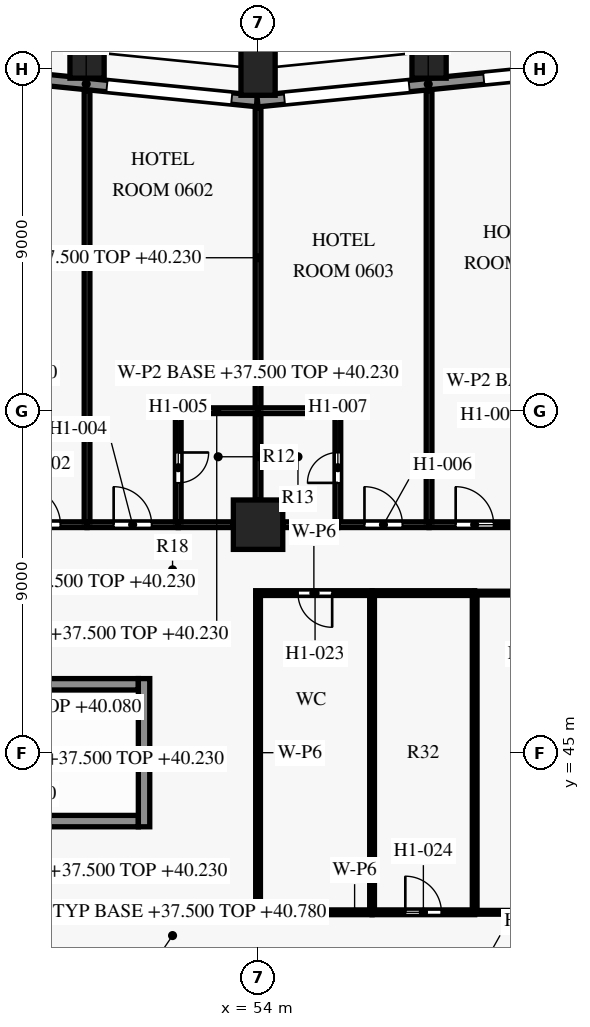
"""IFC4 building model, lengths in metres.
Left out: names, types, materials, properties, quantities, classifications, styles, units other than length and angle.
Written with IfcOpenShell. Run it as: python <this file> out.ifc"""

import sys

from ifc_helpers import new_model, si_unit, direction, frame, frame_2d, origin, origin_2d, place, context, subcontext, project, spatial, rectangle, extrude, element, fill, save


model = new_model("IFC4")
c1 = context("Model", 3, precision=1e-05, world=origin(), true_north=direction((0.0, 1.0)))
c2 = subcontext(c1, "Body", "Model", "MODEL_VIEW")
j1 = project(units=[si_unit("LENGTHUNIT", "METRE"), si_unit("PLANEANGLEUNIT", "RADIAN")], contexts=[c1])
p1 = place(None, origin())
s1 = spatial("IfcSite", under=j1, at=p1, CompositionType="ELEMENT")
p2 = place(p1, origin())
s2 = spatial("IfcBuilding", under=s1, at=p2, CompositionType="ELEMENT")
p3 = place(p2, frame((0.0, 0.0, 37.5)))
s3 = spatial("IfcBuildingStorey", under=s2, at=p3, CompositionType="ELEMENT", Elevation=37.5)
for number, where, z_axis, x_axis in (
    (1, (58.5, 63.45, 0.0), (0.0, 0.0, 1.0), (-0.995, -0.1, 0.0)),
    (2, (54.0, 63.0, 0.0), (0.0, 0.0, 1.0), (-1.0, 0.0, 0.0)),
    (3, (49.5, 63.45, 0.0), (0.0, 0.0, 1.0), (-0.995, 0.1, 0.0)),
):
    element("IfcColumn", number, at=place(p3, frame(where, z_axis=z_axis, x_axis=x_axis)), inside=s3, PredefinedType="COLUMN", context=c2, shape_type="SweptSolid", body=[
        extrude(rectangle(XDim=0.9, YDim=1.4, at=origin_2d()), origin(), (0.0, 0.0, 1.0), 3.6),
    ])
p4 = place(p3, frame((54.0, 51.0, 0.0), z_axis=(0.0, 0.0, 1.0), x_axis=(1.0, 0.0, 0.0)))
e4 = element("IfcColumn", 4, at=p4, inside=s3, PredefinedType="COLUMN", context=c2, shape_type="SweptSolid", body=[
    extrude(rectangle(XDim=1.3, YDim=1.3, at=origin_2d()), origin(), (0.0, 0.0, 1.0), 3.6),
])
p5 = place(p3, frame((53.985, 62.144, 0.0), z_axis=(0.0, 0.0, 1.0), x_axis=(0.995037993253, 0.099495688264, 0.0)))
e5 = element("IfcWall", 5, at=p5, inside=s3, PredefinedType="SOLIDWALL", context=c2, shape_type="SweptSolid", body=[
    extrude(rectangle(XDim=9.03, YDim=0.3, at=frame_2d((4.515, 0.0))), origin(), (0.0, 0.0, 1.0), 2.95),
])
p6 = place(p5, frame((0.711, 0.0, 0.15)))
e6 = element("IfcOpeningElement", 6, at=p6, cuts=e5, PredefinedType="OPENING", context=c2, shape_type="SweptSolid", body=[
    extrude(rectangle(XDim=3.3, YDim=2.4, at=frame_2d((1.65, 1.2))), frame((0.0, 0.16, 0.0), z_axis=(0.0, -1.0, 0.0), x_axis=(1.0, 0.0, 0.0)), (0.0, 0.0, 1.0), 0.32),
])
p7 = place(p5, frame((5.984, 0.0, 0.75)))
e7 = element("IfcOpeningElement", 7, at=p7, cuts=e5, PredefinedType="OPENING", context=c2, shape_type="SweptSolid", body=[
    extrude(rectangle(XDim=1.8, YDim=1.8, at=frame_2d((0.9, 0.9))), frame((0.0, 0.16, 0.0), z_axis=(0.0, -1.0, 0.0), x_axis=(1.0, 0.0, 0.0)), (0.0, 0.0, 1.0), 0.32),
])
p8 = place(p3, frame((44.985, 63.047, 0.0), z_axis=(0.0, 0.0, 1.0), x_axis=(0.995035316196, -0.099522457379, 0.0)))
e8 = element("IfcWall", 8, at=p8, inside=s3, PredefinedType="SOLIDWALL", context=c2, shape_type="SweptSolid", body=[
    extrude(rectangle(XDim=9.03, YDim=0.3, at=frame_2d((4.515, 0.0))), origin(), (0.0, 0.0, 1.0), 2.95),
])
p9 = place(p8, frame((1.291, 0.0, 0.75)))
e9 = element("IfcOpeningElement", 9, at=p9, cuts=e8, PredefinedType="OPENING", context=c2, shape_type="SweptSolid", body=[
    extrude(rectangle(XDim=1.8, YDim=1.8, at=frame_2d((0.9, 0.9))), frame((0.0, 0.16, 0.0), z_axis=(0.0, -1.0, 0.0), x_axis=(1.0, 0.0, 0.0)), (0.0, 0.0, 1.0), 0.32),
])
p10 = place(p8, frame((5.064, 0.0, 0.15)))
e10 = element("IfcOpeningElement", 10, at=p10, cuts=e8, PredefinedType="OPENING", context=c2, shape_type="SweptSolid", body=[
    extrude(rectangle(XDim=3.3, YDim=2.4, at=frame_2d((1.65, 1.2))), frame((0.0, 0.16, 0.0), z_axis=(0.0, -1.0, 0.0), x_axis=(1.0, 0.0, 0.0)), (0.0, 0.0, 1.0), 0.32),
])
p11 = place(p3, frame((43.15, 43.2, 0.0), z_axis=(0.0, 0.0, 1.0), x_axis=(1.0, 0.0, 0.0)))
e11 = element("IfcWall", 11, at=p11, inside=s3, PredefinedType="SHEAR", context=c2, shape_type="SweptSolid", body=[
    extrude(rectangle(XDim=7.7, YDim=0.3, at=frame_2d((3.85, 0.0))), origin(), (0.0, 0.0, 1.0), 3.3),
])
p12 = place(p11, frame((0.25, 0.0, 0.0)))
e12 = element("IfcOpeningElement", 12, at=p12, cuts=e11, PredefinedType="OPENING", context=c2, shape_type="SweptSolid", body=[
    extrude(rectangle(XDim=1.2, YDim=2.2, at=frame_2d((0.6, 1.1))), frame((0.0, 0.16, 0.0), z_axis=(0.0, -1.0, 0.0), x_axis=(1.0, 0.0, 0.0)), (0.0, 0.0, 1.0), 0.32),
])
p13 = place(p3, frame((43.15, 46.8, 0.0), z_axis=(0.0, 0.0, 1.0), x_axis=(1.0, 0.0, 0.0)))
e13 = element("IfcWall", 13, at=p13, inside=s3, PredefinedType="SHEAR", context=c2, shape_type="SweptSolid", body=[
    extrude(rectangle(XDim=7.7, YDim=0.3, at=frame_2d((3.85, 0.0))), origin(), (0.0, 0.0, 1.0), 3.3),
])
p14 = place(p3, frame((51.0, 43.05, 0.0), z_axis=(0.0, 0.0, 1.0), x_axis=(0.0, 1.0, 0.0)))
e14 = element("IfcWall", 14, at=p14, inside=s3, PredefinedType="SHEAR", context=c2, shape_type="SweptSolid", body=[
    extrude(rectangle(XDim=3.9, YDim=0.3, at=frame_2d((1.95, 0.0))), origin(), (0.0, 0.0, 1.0), 3.3),
])
p15 = place(p3, frame((53.938, 40.8, 0.0), z_axis=(0.0, 0.0, 1.0), x_axis=(1.0, 0.0, 0.0)))
e15 = element("IfcWall", 15, at=p15, inside=s3, PredefinedType="PARTITIONING", context=c2, shape_type="SweptSolid", body=[
    extrude(rectangle(XDim=3.062, YDim=0.125, at=frame_2d((1.531, 0.0))), origin(), (0.0, 0.0, 1.0), 2.73),
])
p16 = place(p3, frame((57.0, 40.8, 0.0), z_axis=(0.0, 0.0, 1.0), x_axis=(1.0, 0.0, 0.0)))
e16 = element("IfcWall", 16, at=p16, inside=s3, PredefinedType="PARTITIONING", context=c2, shape_type="SweptSolid", body=[
    extrude(rectangle(XDim=2.7, YDim=0.125, at=frame_2d((1.35, 0.0))), origin(), (0.0, 0.0, 1.0), 3.28),
])
p17 = place(p16, frame((0.875, 0.0, 0.0)))
e17 = element("IfcOpeningElement", 17, at=p17, cuts=e16, PredefinedType="OPENING", context=c2, shape_type="SweptSolid", body=[
    extrude(rectangle(XDim=0.95, YDim=2.1, at=frame_2d((0.475, 1.05))), frame((0.0, 0.073, 0.0), z_axis=(0.0, -1.0, 0.0), x_axis=(1.0, 0.0, 0.0)), (0.0, 0.0, 1.0), 0.145),
])
p18 = place(p3, frame((59.7, 40.8, 0.0), z_axis=(0.0, 0.0, 1.0), x_axis=(1.0, 0.0, 0.0)))
e18 = element("IfcWall", 18, at=p18, inside=s3, PredefinedType="PARTITIONING", context=c2, shape_type="SweptSolid", body=[
    extrude(rectangle(XDim=3.35, YDim=0.1, at=frame_2d((1.675, 0.0))), origin(), (0.0, 0.0, 1.0), 2.73),
])
p19 = place(p3, frame((54.0, 49.137, 0.0), z_axis=(0.0, 0.0, 1.0), x_axis=(0.0, -1.0, 0.0)))
e19 = element("IfcWall", 19, at=p19, inside=s3, PredefinedType="PARTITIONING", context=c2, shape_type="SweptSolid", body=[
    extrude(rectangle(XDim=8.275, YDim=0.125, at=frame_2d((4.137, 0.0))), origin(), (0.0, 0.0, 1.0), 2.73),
])
for number, where, z_axis, x_axis in (
    (20, (57.0, 49.137, 0.0), (0.0, 0.0, 1.0), (0.0, -1.0, 0.0)),
    (21, (59.7, 49.137, 0.0), (0.0, 0.0, 1.0), (0.0, -1.0, 0.0)),
):
    element("IfcWall", number, at=place(p3, frame(where, z_axis=z_axis, x_axis=x_axis)), inside=s3, PredefinedType="PARTITIONING", context=c2, shape_type="SweptSolid", body=[
        extrude(rectangle(XDim=8.275, YDim=0.125, at=frame_2d((4.137, 0.0))), origin(), (0.0, 0.0, 1.0), 3.28),
    ])
p20 = place(p3, frame((57.0, 49.2, 0.0), z_axis=(0.0, 0.0, 1.0), x_axis=(-1.0, 0.0, 0.0)))
e22 = element("IfcWall", 22, at=p20, inside=s3, PredefinedType="PARTITIONING", context=c2, shape_type="SweptSolid", body=[
    extrude(rectangle(XDim=3.062, YDim=0.125, at=frame_2d((1.531, 0.0))), origin(), (0.0, 0.0, 1.0), 2.73),
])
p21 = place(p20, frame((1.05, 0.0, 0.0)))
e23 = element("IfcOpeningElement", 23, at=p21, cuts=e22, PredefinedType="OPENING", context=c2, shape_type="SweptSolid", body=[
    extrude(rectangle(XDim=0.9, YDim=2.1, at=frame_2d((0.45, 1.05))), frame((0.0, 0.073, 0.0), z_axis=(0.0, -1.0, 0.0), x_axis=(1.0, 0.0, 0.0)), (0.0, 0.0, 1.0), 0.145),
])
p22 = place(p3, frame((59.7, 49.2, 0.0), z_axis=(0.0, 0.0, 1.0), x_axis=(-1.0, 0.0, 0.0)))
e24 = element("IfcWall", 24, at=p22, inside=s3, PredefinedType="PARTITIONING", context=c2, shape_type="SweptSolid", body=[
    extrude(rectangle(XDim=2.7, YDim=0.125, at=frame_2d((1.35, 0.0))), origin(), (0.0, 0.0, 1.0), 3.28),
])
p23 = place(p3, frame((63.05, 49.2, 0.0), z_axis=(0.0, 0.0, 1.0), x_axis=(-1.0, 0.0, 0.0)))
e25 = element("IfcWall", 25, at=p23, inside=s3, PredefinedType="PARTITIONING", context=c2, shape_type="SweptSolid", body=[
    extrude(rectangle(XDim=3.35, YDim=0.1, at=frame_2d((1.675, 0.0))), origin(), (0.0, 0.0, 1.0), 2.73),
])
p24 = place(p23, frame((1.25, 0.0, 0.0)))
e26 = element("IfcOpeningElement", 26, at=p24, cuts=e25, PredefinedType="OPENING", context=c2, shape_type="SweptSolid", body=[
    extrude(rectangle(XDim=0.9, YDim=2.1, at=frame_2d((0.45, 1.05))), frame((0.0, 0.06, 0.0), z_axis=(0.0, -1.0, 0.0), x_axis=(1.0, 0.0, 0.0)), (0.0, 0.0, 1.0), 0.12),
])
p25 = place(p3, frame((47.1, 51.0, 0.0), z_axis=(0.0, 0.0, 1.0), x_axis=(1.0, 0.0, 0.0)))
e27 = element("IfcWall", 27, at=p25, inside=s3, PredefinedType="PARTITIONING", context=c2, shape_type="SweptSolid", body=[
    extrude(rectangle(XDim=2.4, YDim=0.15, at=frame_2d((1.2, 0.0))), origin(), (0.0, 0.0, 1.0), 2.58),
])
p26 = place(p25, frame((0.7, 0.0, 0.0)))
e28 = element("IfcOpeningElement", 28, at=p26, cuts=e27, PredefinedType="OPENING", context=c2, shape_type="SweptSolid", body=[
    extrude(rectangle(XDim=1.0, YDim=2.1, at=frame_2d((0.5, 1.05))), frame((0.0, 0.085, 0.0), z_axis=(0.0, -1.0, 0.0), x_axis=(1.0, 0.0, 0.0)), (0.0, 0.0, 1.0), 0.17),
])
p27 = place(p3, frame((49.5, 51.0, 0.0), z_axis=(0.0, 0.0, 1.0), x_axis=(1.0, 0.0, 0.0)))
e29 = element("IfcWall", 29, at=p27, inside=s3, PredefinedType="PARTITIONING", context=c2, shape_type="SweptSolid", body=[
    extrude(rectangle(XDim=2.4, YDim=0.15, at=frame_2d((1.2, 0.0))), origin(), (0.0, 0.0, 1.0), 2.58),
])
p28 = place(p27, frame((0.7, 0.0, 0.0)))
e30 = element("IfcOpeningElement", 30, at=p28, cuts=e29, PredefinedType="OPENING", context=c2, shape_type="SweptSolid", body=[
    extrude(rectangle(XDim=1.0, YDim=2.1, at=frame_2d((0.5, 1.05))), frame((0.0, 0.085, 0.0), z_axis=(0.0, -1.0, 0.0), x_axis=(1.0, 0.0, 0.0)), (0.0, 0.0, 1.0), 0.17),
])
for number, where, z_axis, x_axis in (
    (31, (51.9, 51.0, 0.0), (0.0, 0.0, 1.0), (1.0, 0.0, 0.0)),
    (32, (54.655, 51.0, 0.0), (0.0, 0.0, 1.0), (1.0, 0.0, 0.0)),
):
    element("IfcWall", number, at=place(p3, frame(where, z_axis=z_axis, x_axis=x_axis)), inside=s3, PredefinedType="PARTITIONING", context=c2, shape_type="SweptSolid", body=[
        extrude(rectangle(XDim=1.445, YDim=0.15, at=frame_2d((0.723, 0.0))), origin(), (0.0, 0.0, 1.0), 2.58),
    ])
p29 = place(p3, frame((56.1, 51.0, 0.0), z_axis=(0.0, 0.0, 1.0), x_axis=(1.0, 0.0, 0.0)))
e33 = element("IfcWall", 33, at=p29, inside=s3, PredefinedType="PARTITIONING", context=c2, shape_type="SweptSolid", body=[
    extrude(rectangle(XDim=2.4, YDim=0.15, at=frame_2d((1.2, 0.0))), origin(), (0.0, 0.0, 1.0), 2.58),
])
p30 = place(p29, frame((0.7, 0.0, 0.0)))
e34 = element("IfcOpeningElement", 34, at=p30, cuts=e33, PredefinedType="OPENING", context=c2, shape_type="SweptSolid", body=[
    extrude(rectangle(XDim=1.0, YDim=2.1, at=frame_2d((0.5, 1.05))), frame((0.0, 0.085, 0.0), z_axis=(0.0, -1.0, 0.0), x_axis=(1.0, 0.0, 0.0)), (0.0, 0.0, 1.0), 0.17),
])
p31 = place(p3, frame((58.5, 51.0, 0.0), z_axis=(0.0, 0.0, 1.0), x_axis=(1.0, 0.0, 0.0)))
e35 = element("IfcWall", 35, at=p31, inside=s3, PredefinedType="PARTITIONING", context=c2, shape_type="SweptSolid", body=[
    extrude(rectangle(XDim=2.4, YDim=0.15, at=frame_2d((1.2, 0.0))), origin(), (0.0, 0.0, 1.0), 2.58),
])
p32 = place(p31, frame((0.7, 0.0, 0.0)))
e36 = element("IfcOpeningElement", 36, at=p32, cuts=e35, PredefinedType="OPENING", context=c2, shape_type="SweptSolid", body=[
    extrude(rectangle(XDim=1.0, YDim=2.1, at=frame_2d((0.5, 1.05))), frame((0.0, 0.085, 0.0), z_axis=(0.0, -1.0, 0.0), x_axis=(1.0, 0.0, 0.0)), (0.0, 0.0, 1.0), 0.17),
])
p33 = place(p3, frame((56.1, 51.075, 0.0), z_axis=(0.0, 0.0, 1.0), x_axis=(0.0, 1.0, 0.0)))
e37 = element("IfcWall", 37, at=p33, inside=s3, PredefinedType="PARTITIONING", context=c2, shape_type="SweptSolid", body=[
    extrude(rectangle(XDim=2.85, YDim=0.15, at=frame_2d((1.425, 0.0))), origin(), (0.0, 0.0, 1.0), 2.58),
])
p34 = place(p33, frame((1.025, 0.0, 0.0)))
e38 = element("IfcOpeningElement", 38, at=p34, cuts=e37, PredefinedType="OPENING", context=c2, shape_type="SweptSolid", body=[
    extrude(rectangle(XDim=0.8, YDim=2.1, at=frame_2d((0.4, 1.05))), frame((0.0, 0.085, 0.0), z_axis=(0.0, -1.0, 0.0), x_axis=(1.0, 0.0, 0.0)), (0.0, 0.0, 1.0), 0.17),
])
p35 = place(p3, frame((51.9, 53.925, 0.0), z_axis=(0.0, 0.0, 1.0), x_axis=(0.0, -1.0, 0.0)))
e39 = element("IfcWall", 39, at=p35, inside=s3, PredefinedType="PARTITIONING", context=c2, shape_type="SweptSolid", body=[
    extrude(rectangle(XDim=2.85, YDim=0.15, at=frame_2d((1.425, 0.0))), origin(), (0.0, 0.0, 1.0), 2.58),
])
p36 = place(p35, frame((1.025, 0.0, 0.0)))
e40 = element("IfcOpeningElement", 40, at=p36, cuts=e39, PredefinedType="OPENING", context=c2, shape_type="SweptSolid", body=[
    extrude(rectangle(XDim=0.8, YDim=2.1, at=frame_2d((0.4, 1.05))), frame((0.0, 0.085, 0.0), z_axis=(0.0, -1.0, 0.0), x_axis=(1.0, 0.0, 0.0)), (0.0, 0.0, 1.0), 0.17),
])
p37 = place(p3, frame((54.0, 53.925, 0.0), z_axis=(0.0, 0.0, 1.0), x_axis=(0.0, -1.0, 0.0)))
e41 = element("IfcWall", 41, at=p37, inside=s3, PredefinedType="PARTITIONING", context=c2, shape_type="SweptSolid", body=[
    extrude(rectangle(XDim=2.27, YDim=0.15, at=frame_2d((1.135, 0.0))), origin(), (0.0, 0.0, 1.0), 2.73),
])
for number, where, z_axis, x_axis in (
    (42, (54.0, 54.0, 0.0), (0.0, 0.0, 1.0), (-1.0, 0.0, 0.0)),
    (43, (56.175, 54.0, 0.0), (0.0, 0.0, 1.0), (-1.0, 0.0, 0.0)),
):
    element("IfcWall", number, at=place(p3, frame(where, z_axis=z_axis, x_axis=x_axis)), inside=s3, PredefinedType="PARTITIONING", context=c2, shape_type="SweptSolid", body=[
        extrude(rectangle(XDim=2.175, YDim=0.15, at=frame_2d((1.087, 0.0))), origin(), (0.0, 0.0, 1.0), 2.73),
    ])
p38 = place(p3, frame((54.0, 61.975, 0.0), z_axis=(0.0, 0.0, 1.0), x_axis=(0.0, -1.0, 0.0)))
e44 = element("IfcWall", 44, at=p38, inside=s3, PredefinedType="PARTITIONING", context=c2, shape_type="SweptSolid", body=[
    extrude(rectangle(XDim=7.9, YDim=0.15, at=frame_2d((3.95, 0.0))), origin(), (0.0, 0.0, 1.0), 2.73),
])
for number, where, z_axis, x_axis in (
    (45, (49.5, 62.425, 0.0), (0.0, 0.0, 1.0), (0.0, -1.0, 0.0)),
    (46, (58.5, 62.425, 0.0), (0.0, 0.0, 1.0), (0.0, -1.0, 0.0)),
):
    element("IfcWall", number, at=place(p3, frame(where, z_axis=z_axis, x_axis=x_axis)), inside=s3, PredefinedType="PARTITIONING", context=c2, shape_type="SweptSolid", body=[
        extrude(rectangle(XDim=11.35, YDim=0.15, at=frame_2d((5.675, 0.0))), origin(), (0.0, 0.0, 1.0), 2.58),
    ])
p39 = place(p6, origin())
e47 = element("IfcWindow", 47, at=p39, inside=s3, PartitioningType="SINGLE_PANEL", PredefinedType="WINDOW", context=c2, shape_type="SweptSolid", body=[
    extrude(rectangle(XDim=3.3, YDim=2.4, at=frame_2d((1.65, 1.2))), frame((0.0, 0.03, 0.0), z_axis=(0.0, -1.0, 0.0), x_axis=(1.0, 0.0, 0.0)), (0.0, 0.0, 1.0), 0.06),
])
fill(e6, e47)
p40 = place(p7, origin())
e48 = element("IfcWindow", 48, at=p40, inside=s3, PartitioningType="SINGLE_PANEL", PredefinedType="WINDOW", context=c2, shape_type="SweptSolid", body=[
    extrude(rectangle(XDim=1.8, YDim=1.8, at=frame_2d((0.9, 0.9))), frame((0.0, 0.03, 0.0), z_axis=(0.0, -1.0, 0.0), x_axis=(1.0, 0.0, 0.0)), (0.0, 0.0, 1.0), 0.06),
])
fill(e7, e48)
p41 = place(p10, origin())
e49 = element("IfcWindow", 49, at=p41, inside=s3, PartitioningType="SINGLE_PANEL", PredefinedType="WINDOW", context=c2, shape_type="SweptSolid", body=[
    extrude(rectangle(XDim=3.3, YDim=2.4, at=frame_2d((1.65, 1.2))), frame((0.0, 0.03, 0.0), z_axis=(0.0, -1.0, 0.0), x_axis=(1.0, 0.0, 0.0)), (0.0, 0.0, 1.0), 0.06),
])
fill(e10, e49)
p42 = place(p26, origin())
e50 = element("IfcDoor", 50, at=p42, inside=s3, OperationType="SINGLE_SWING_LEFT", PredefinedType="DOOR", context=c2, shape_type="SweptSolid", body=[
    extrude(rectangle(XDim=1.0, YDim=2.1, at=frame_2d((0.5, 1.05))), frame((0.0, 0.025, 0.0), z_axis=(0.0, -1.0, 0.0), x_axis=(1.0, 0.0, 0.0)), (0.0, 0.0, 1.0), 0.05),
])
fill(e28, e50)
p43 = place(p28, origin())
e51 = element("IfcDoor", 51, at=p43, inside=s3, OperationType="SINGLE_SWING_LEFT", PredefinedType="DOOR", context=c2, shape_type="SweptSolid", body=[
    extrude(rectangle(XDim=1.0, YDim=2.1, at=frame_2d((0.5, 1.05))), frame((0.0, 0.025, 0.0), z_axis=(0.0, -1.0, 0.0), x_axis=(1.0, 0.0, 0.0)), (0.0, 0.0, 1.0), 0.05),
])
fill(e30, e51)
p44 = place(p36, origin())
e52 = element("IfcDoor", 52, at=p44, inside=s3, OperationType="SINGLE_SWING_LEFT", PredefinedType="DOOR", context=c2, shape_type="SweptSolid", body=[
    extrude(rectangle(XDim=0.8, YDim=2.1, at=frame_2d((0.4, 1.05))), frame((0.0, 0.025, 0.0), z_axis=(0.0, -1.0, 0.0), x_axis=(1.0, 0.0, 0.0)), (0.0, 0.0, 1.0), 0.05),
])
fill(e40, e52)
p45 = place(p30, origin())
e53 = element("IfcDoor", 53, at=p45, inside=s3, OperationType="SINGLE_SWING_LEFT", PredefinedType="DOOR", context=c2, shape_type="SweptSolid", body=[
    extrude(rectangle(XDim=1.0, YDim=2.1, at=frame_2d((0.5, 1.05))), frame((0.0, 0.025, 0.0), z_axis=(0.0, -1.0, 0.0), x_axis=(1.0, 0.0, 0.0)), (0.0, 0.0, 1.0), 0.05),
])
fill(e34, e53)
p46 = place(p34, origin())
e54 = element("IfcDoor", 54, at=p46, inside=s3, OperationType="SINGLE_SWING_LEFT", PredefinedType="DOOR", context=c2, shape_type="SweptSolid", body=[
    extrude(rectangle(XDim=0.8, YDim=2.1, at=frame_2d((0.4, 1.05))), frame((0.0, 0.025, 0.0), z_axis=(0.0, -1.0, 0.0), x_axis=(1.0, 0.0, 0.0)), (0.0, 0.0, 1.0), 0.05),
])
fill(e38, e54)
p47 = place(p32, origin())
e55 = element("IfcDoor", 55, at=p47, inside=s3, OperationType="SINGLE_SWING_LEFT", PredefinedType="DOOR", context=c2, shape_type="SweptSolid", body=[
    extrude(rectangle(XDim=1.0, YDim=2.1, at=frame_2d((0.5, 1.05))), frame((0.0, 0.025, 0.0), z_axis=(0.0, -1.0, 0.0), x_axis=(1.0, 0.0, 0.0)), (0.0, 0.0, 1.0), 0.05),
])
fill(e36, e55)
p48 = place(p21, origin())
e56 = element("IfcDoor", 56, at=p48, inside=s3, OperationType="SINGLE_SWING_LEFT", PredefinedType="DOOR", context=c2, shape_type="SweptSolid", body=[
    extrude(rectangle(XDim=0.9, YDim=2.1, at=frame_2d((0.45, 1.05))), frame((0.0, 0.025, 0.0), z_axis=(0.0, -1.0, 0.0), x_axis=(1.0, 0.0, 0.0)), (0.0, 0.0, 1.0), 0.05),
])
fill(e23, e56)
p49 = place(p17, origin())
e57 = element("IfcDoor", 57, at=p49, inside=s3, OperationType="SINGLE_SWING_LEFT", PredefinedType="DOOR", context=c2, shape_type="SweptSolid", body=[
    extrude(rectangle(XDim=0.95, YDim=2.1, at=frame_2d((0.475, 1.05))), frame((0.0, 0.025, 0.0), z_axis=(0.0, -1.0, 0.0), x_axis=(1.0, 0.0, 0.0)), (0.0, 0.0, 1.0), 0.05),
])
fill(e17, e57)
save(model, sys.argv[1])
